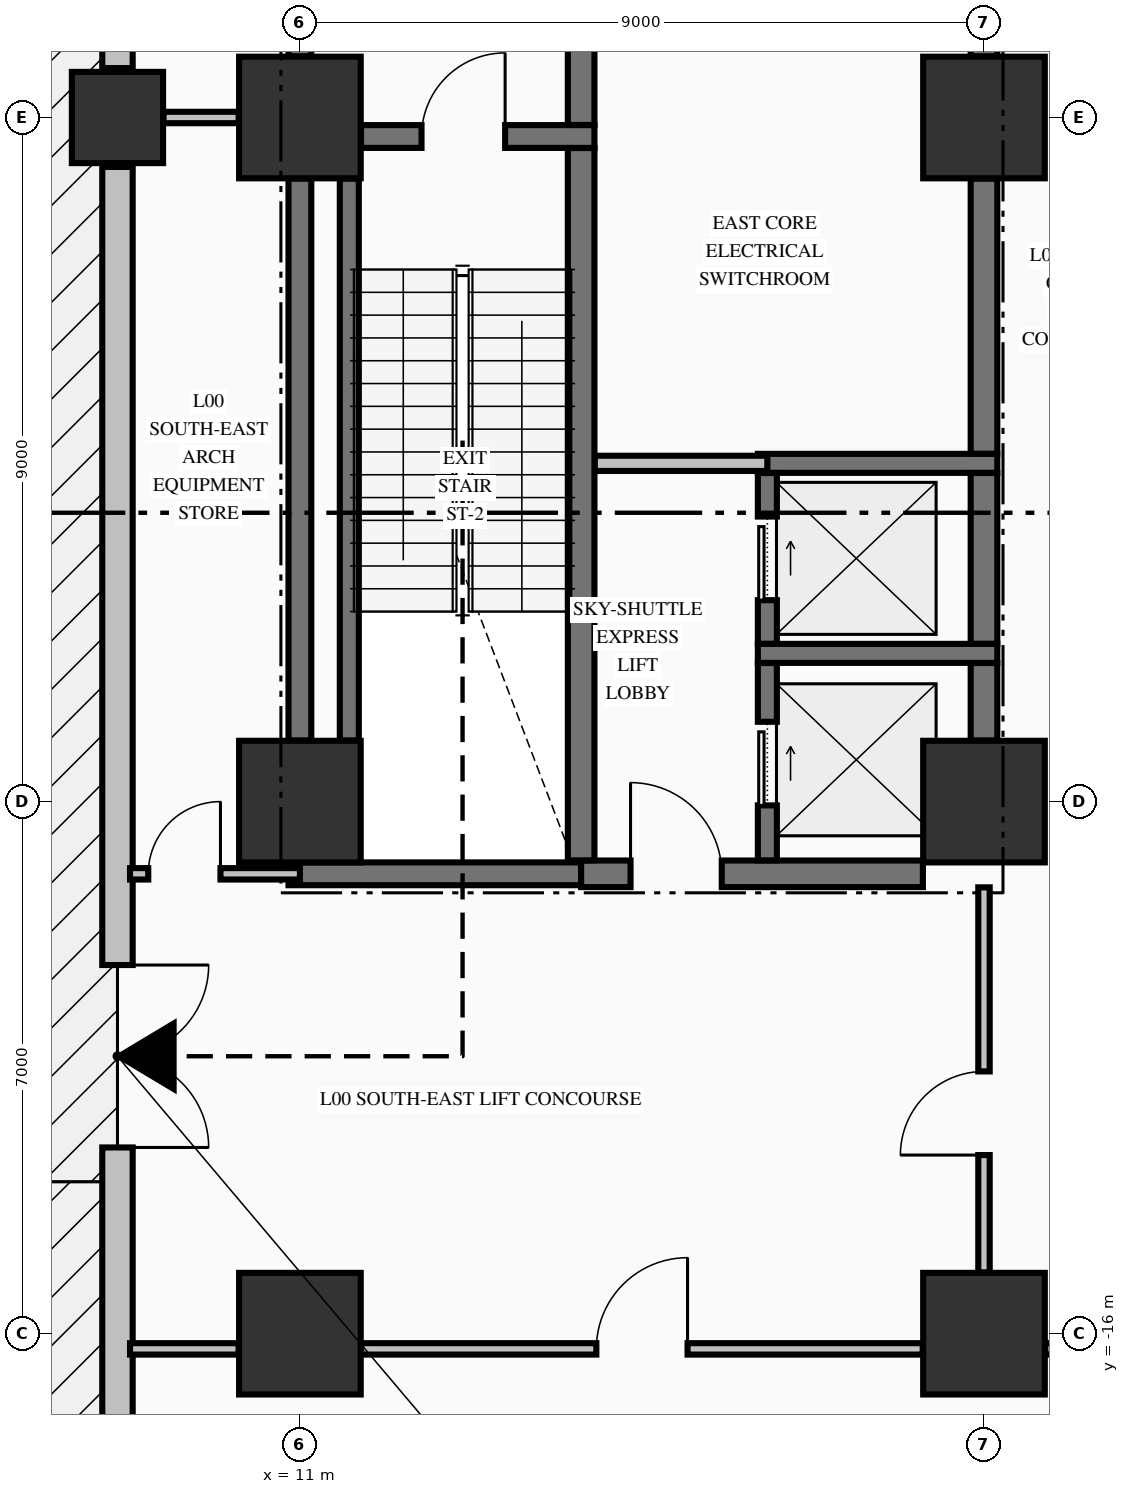
"""IFC4 building model, lengths in metres.
Left out: names, types, materials, properties, quantities, classifications, styles, units other than length and angle.
Written with IfcOpenShell. Run it as: python <this file> out.ifc"""

import sys

from ifc_helpers import new_model, si_unit, direction, frame, frame_2d, origin, origin_2d, place, context, subcontext, project, spatial, rectangle, extrude, element, fill, save


model = new_model("IFC4")
c1 = context("Model", 3, precision=1e-05, world=origin(), true_north=direction((0.0, 1.0)))
c2 = subcontext(c1, "Body", "Model", "MODEL_VIEW")
j1 = project(units=[si_unit("LENGTHUNIT", "METRE"), si_unit("PLANEANGLEUNIT", "RADIAN")], contexts=[c1])
p1 = place(None, origin())
s1 = spatial("IfcSite", under=j1, at=p1, CompositionType="ELEMENT")
p2 = place(p1, origin())
s2 = spatial("IfcBuilding", under=s1, at=p2, CompositionType="ELEMENT")
p3 = place(p2, origin())
s3 = spatial("IfcBuildingStorey", under=s2, at=p3, CompositionType="ELEMENT", Elevation=0.0)
for number, where, z_axis, x_axis in (
    (1, (11.0, -16.0, 0.0), (0.0, 0.0, 1.0), (1.0, 0.0, 0.0)),
    (2, (11.0, -9.0, 0.0), (0.0, 0.0, 1.0), (1.0, 0.0, 0.0)),
    (3, (11.0, 0.0, 0.0), (0.0, 0.0, 1.0), (1.0, 0.0, 0.0)),
    (4, (20.0, -16.0, 0.0), (0.0, 0.0, 1.0), (1.0, 0.0, 0.0)),
    (5, (20.0, -9.0, 0.0), (0.0, 0.0, 1.0), (1.0, 0.0, 0.0)),
    (6, (20.0, 0.0, 0.0), (0.0, 0.0, 1.0), (1.0, 0.0, 0.0)),
):
    element("IfcColumn", number, at=place(p3, frame(where, z_axis=z_axis, x_axis=x_axis)), inside=s3, PredefinedType="COLUMN", context=c2, shape_type="SweptSolid", body=[
        extrude(rectangle(XDim=1.6, YDim=1.6, at=origin_2d()), origin(), (0.0, 0.0, 1.0), 5.09),
    ])
p4 = place(p3, frame((8.6, 0.0, 0.0), z_axis=(0.0, 0.0, 1.0), x_axis=(1.0, 0.0, 0.0)))
e7 = element("IfcColumn", 7, at=p4, inside=s3, PredefinedType="COLUMN", context=c2, shape_type="SweptSolid", body=[
    extrude(rectangle(XDim=1.2, YDim=1.2, at=origin_2d()), origin(), (0.0, 0.0, 1.0), 5.09),
])
p5 = place(p3, frame((8.6, 15.35, 0.0), z_axis=(0.0, 0.0, 1.0), x_axis=(0.0, -1.0, 0.0)))
e8 = element("IfcWall", 8, at=p5, inside=s3, PredefinedType="STANDARD", context=c2, shape_type="SweptSolid", body=[
    extrude(rectangle(XDim=14.7, YDim=0.4, at=frame_2d((7.35, 0.0))), origin(), (0.0, 0.0, 1.0), 4.132),
])
p6 = place(p3, frame((8.6, -0.65, 0.0), z_axis=(0.0, 0.0, 1.0), x_axis=(0.0, -1.0, 0.0)))
e9 = element("IfcWall", 9, at=p6, inside=s3, PredefinedType="STANDARD", context=c2, shape_type="SweptSolid", body=[
    extrude(rectangle(XDim=24.7, YDim=0.4, at=frame_2d((12.35, 0.0))), origin(), (0.0, 0.0, 1.0), 4.132),
])
p7 = place(p6, frame((10.5, 0.0, 0.0)))
e10 = element("IfcOpeningElement", 10, at=p7, cuts=e9, PredefinedType="OPENING", context=c2, shape_type="SweptSolid", body=[
    extrude(rectangle(XDim=2.4, YDim=2.6, at=frame_2d((1.2, 1.3))), frame((0.0, 0.21, 0.0), z_axis=(0.0, -1.0, 0.0), x_axis=(1.0, 0.0, 0.0)), (0.0, 0.0, 1.0), 0.42),
])
p8 = place(p3, frame((10.85, -9.95, 0.0), z_axis=(0.0, 0.0, 1.0), x_axis=(1.0, 0.0, 0.0)))
e11 = element("IfcWall", 11, at=p8, inside=s3, PredefinedType="SHEAR", context=c2, shape_type="SweptSolid", body=[
    extrude(rectangle(XDim=3.85, YDim=0.3, at=frame_2d((1.925, 0.0))), origin(), (0.0, 0.0, 1.0), 5.09),
])
p9 = place(p3, frame((14.7, -9.95, 0.0), z_axis=(0.0, 0.0, 1.0), x_axis=(1.0, 0.0, 0.0)))
e12 = element("IfcWall", 12, at=p9, inside=s3, PredefinedType="SHEAR", context=c2, shape_type="SweptSolid", body=[
    extrude(rectangle(XDim=4.496, YDim=0.35, at=frame_2d((2.248, 0.0))), origin(), (0.0, 0.0, 1.0), 5.09),
])
p10 = place(p9, frame((0.65, 0.0, 0.0)))
e13 = element("IfcOpeningElement", 13, at=p10, cuts=e12, PredefinedType="OPENING", context=c2, shape_type="SweptSolid", body=[
    extrude(rectangle(XDim=1.2, YDim=2.15, at=frame_2d((0.6, 1.075))), frame((0.0, 0.185, 0.0), z_axis=(0.0, -1.0, 0.0), x_axis=(1.0, 0.0, 0.0)), (0.0, 0.0, 1.0), 0.37),
])
for number, where, z_axis, x_axis in (
    (14, (17.025, -7.05, 0.0), (0.0, 0.0, 1.0), (1.0, 0.0, 0.0)),
    (15, (17.025, -4.55, 0.0), (0.0, 0.0, 1.0), (1.0, 0.0, 0.0)),
):
    element("IfcWall", number, at=place(p3, frame(where, z_axis=z_axis, x_axis=x_axis)), inside=s3, PredefinedType="SOLIDWALL", context=c2, shape_type="SweptSolid", body=[
        extrude(rectangle(XDim=3.15, YDim=0.25, at=frame_2d((1.575, 0.0))), origin(), (0.0, 0.0, 1.0), 5.09),
    ])
p11 = place(p3, frame((11.804, -0.25, 0.0), z_axis=(0.0, 0.0, 1.0), x_axis=(1.0, 0.0, 0.0)))
e16 = element("IfcWall", 16, at=p11, inside=s3, PredefinedType="SHEAR", context=c2, shape_type="SweptSolid", body=[
    extrude(rectangle(XDim=3.071, YDim=0.3, at=frame_2d((1.536, 0.0))), origin(), (0.0, 0.0, 1.0), 5.09),
])
p12 = place(p11, frame((0.796, 0.0, 0.0)))
e17 = element("IfcOpeningElement", 17, at=p12, cuts=e16, PredefinedType="OPENING", context=c2, shape_type="SweptSolid", body=[
    extrude(rectangle(XDim=1.1, YDim=2.15, at=frame_2d((0.55, 1.075))), frame((0.0, 0.16, 0.0), z_axis=(0.0, -1.0, 0.0), x_axis=(1.0, 0.0, 0.0)), (0.0, 0.0, 1.0), 0.32),
])
p13 = place(p3, frame((8.765, -16.2, 0.0), z_axis=(0.0, 0.0, 1.0), x_axis=(1.0, 0.0, 0.0)))
e18 = element("IfcWall", 18, at=p13, inside=s3, PredefinedType="PARTITIONING", context=c2, shape_type="SweptSolid", body=[
    extrude(rectangle(XDim=1.429, YDim=0.15, at=frame_2d((0.715, 0.0))), origin(), (0.0, 0.0, 1.0), 5.09),
])
p14 = place(p3, frame((11.806, -16.2, 0.0), z_axis=(0.0, 0.0, 1.0), x_axis=(1.0, 0.0, 0.0)))
e19 = element("IfcWall", 19, at=p14, inside=s3, PredefinedType="PARTITIONING", context=c2, shape_type="SweptSolid", body=[
    extrude(rectangle(XDim=7.388, YDim=0.15, at=frame_2d((3.694, 0.0))), origin(), (0.0, 0.0, 1.0), 4.132),
])
p15 = place(p14, frame((3.094, 0.0, 0.0)))
e20 = element("IfcOpeningElement", 20, at=p15, cuts=e19, PredefinedType="OPENING", context=c2, shape_type="SweptSolid", body=[
    extrude(rectangle(XDim=1.2, YDim=2.15, at=frame_2d((0.6, 1.075))), frame((0.0, 0.085, 0.0), z_axis=(0.0, -1.0, 0.0), x_axis=(1.0, 0.0, 0.0)), (0.0, 0.0, 1.0), 0.17),
])
p16 = place(p3, frame((20.806, -16.2, 0.0), z_axis=(0.0, 0.0, 1.0), x_axis=(1.0, 0.0, 0.0)))
e21 = element("IfcWall", 21, at=p16, inside=s3, PredefinedType="PARTITIONING", context=c2, shape_type="SweptSolid", body=[
    extrude(rectangle(XDim=4.488, YDim=0.15, at=frame_2d((2.244, 0.0))), origin(), (0.0, 0.0, 1.0), 4.132),
])
p17 = place(p16, frame((0.15, 0.0, 0.0)))
e22 = element("IfcOpeningElement", 22, at=p17, cuts=e21, PredefinedType="OPENING", context=c2, shape_type="SweptSolid", body=[
    extrude(rectangle(XDim=1.1, YDim=2.15, at=frame_2d((0.55, 1.075))), frame((0.0, 0.085, 0.0), z_axis=(0.0, -1.0, 0.0), x_axis=(1.0, 0.0, 0.0)), (0.0, 0.0, 1.0), 0.17),
])
p18 = place(p16, frame((2.844, 0.0, 0.0)))
e23 = element("IfcOpeningElement", 23, at=p18, cuts=e21, PredefinedType="OPENING", context=c2, shape_type="SweptSolid", body=[
    extrude(rectangle(XDim=1.1, YDim=2.15, at=frame_2d((0.55, 1.075))), frame((0.0, 0.085, 0.0), z_axis=(0.0, -1.0, 0.0), x_axis=(1.0, 0.0, 0.0)), (0.0, 0.0, 1.0), 0.17),
])
p19 = place(p3, frame((8.765, -9.95, 0.0), z_axis=(0.0, 0.0, 1.0), x_axis=(1.0, 0.0, 0.0)))
e24 = element("IfcWall", 24, at=p19, inside=s3, PredefinedType="PARTITIONING", context=c2, shape_type="SweptSolid", body=[
    extrude(rectangle(XDim=2.235, YDim=0.15, at=frame_2d((1.118, 0.0))), origin(), (0.0, 0.0, 1.0), 5.09),
])
p20 = place(p19, frame((0.24, 0.0, 0.0)))
e25 = element("IfcOpeningElement", 25, at=p20, cuts=e24, PredefinedType="OPENING", context=c2, shape_type="SweptSolid", body=[
    extrude(rectangle(XDim=0.95, YDim=2.15, at=frame_2d((0.475, 1.075))), frame((0.0, 0.085, 0.0), z_axis=(0.0, -1.0, 0.0), x_axis=(1.0, 0.0, 0.0)), (0.0, 0.0, 1.0), 0.17),
])
p21 = place(p3, frame((14.878, -4.55, 0.0), z_axis=(0.0, 0.0, 1.0), x_axis=(1.0, 0.0, 0.0)))
e26 = element("IfcWall", 26, at=p21, inside=s3, PredefinedType="PARTITIONING", context=c2, shape_type="SweptSolid", body=[
    extrude(rectangle(XDim=2.272, YDim=0.2, at=frame_2d((1.136, 0.0))), origin(), (0.0, 0.0, 1.0), 5.09),
])
p22 = place(p3, frame((9.206, 0.0, 0.0), z_axis=(0.0, 0.0, 1.0), x_axis=(1.0, 0.0, 0.0)))
e27 = element("IfcWall", 27, at=p22, inside=s3, PredefinedType="PARTITIONING", context=c2, shape_type="SweptSolid", body=[
    extrude(rectangle(XDim=0.988, YDim=0.15, at=frame_2d((0.494, 0.0))), origin(), (0.0, 0.0, 1.0), 4.132),
])
p23 = place(p3, frame((11.0, -8.196, 0.0), z_axis=(0.0, 0.0, 1.0), x_axis=(0.0, 1.0, 0.0)))
e28 = element("IfcWall", 28, at=p23, inside=s3, PredefinedType="SHEAR", context=c2, shape_type="SweptSolid", body=[
    extrude(rectangle(XDim=7.392, YDim=0.3, at=frame_2d((3.696, 0.0))), origin(), (0.0, 0.0, 1.0), 5.09),
])
p24 = place(p3, frame((11.0, 0.804, 0.0), z_axis=(0.0, 0.0, 1.0), x_axis=(0.0, 1.0, 0.0)))
e29 = element("IfcWall", 29, at=p24, inside=s3, PredefinedType="SHEAR", context=c2, shape_type="SweptSolid", body=[
    extrude(rectangle(XDim=1.944, YDim=0.3, at=frame_2d((0.972, 0.0))), origin(), (0.0, 0.0, 1.0), 5.09),
])
p25 = place(p24, frame((0.296, 0.0, 0.0)))
e30 = element("IfcOpeningElement", 30, at=p25, cuts=e29, PredefinedType="OPENING", context=c2, shape_type="SweptSolid", body=[
    extrude(rectangle(XDim=1.1, YDim=2.15, at=frame_2d((0.55, 1.075))), frame((0.0, 0.16, 0.0), z_axis=(0.0, -1.0, 0.0), x_axis=(1.0, 0.0, 0.0)), (0.0, 0.0, 1.0), 0.32),
])
p26 = place(p3, frame((11.65, -8.196, 0.0), z_axis=(0.0, 0.0, 1.0), x_axis=(0.0, 1.0, 0.0)))
e31 = element("IfcWall", 31, at=p26, inside=s3, PredefinedType="SOLIDWALL", context=c2, shape_type="SweptSolid", body=[
    extrude(rectangle(XDim=7.392, YDim=0.25, at=frame_2d((3.696, 0.0))), origin(), (0.0, 0.0, 1.0), 5.09),
])
p27 = place(p3, frame((14.7, -9.773, 0.0), z_axis=(0.0, 0.0, 1.0), x_axis=(0.0, 1.0, 0.0)))
e32 = element("IfcWall", 32, at=p27, inside=s3, PredefinedType="SHEAR", context=c2, shape_type="SweptSolid", body=[
    extrude(rectangle(XDim=9.371, YDim=0.35, at=frame_2d((4.686, 0.0))), origin(), (0.0, 0.0, 1.0), 5.09),
])
p28 = place(p3, frame((14.7, -0.098, 0.0), z_axis=(0.0, 0.0, 1.0), x_axis=(0.0, 1.0, 0.0)))
e33 = element("IfcWall", 33, at=p28, inside=s3, PredefinedType="SHEAR", context=c2, shape_type="SweptSolid", body=[
    extrude(rectangle(XDim=2.846, YDim=0.35, at=frame_2d((1.423, 0.0))), origin(), (0.0, 0.0, 1.0), 5.09),
])
p29 = place(p3, frame((17.15, -9.773, 0.0), z_axis=(0.0, 0.0, 1.0), x_axis=(0.0, 1.0, 0.0)))
e34 = element("IfcWall", 34, at=p29, inside=s3, PredefinedType="SOLIDWALL", context=c2, shape_type="SweptSolid", body=[
    extrude(rectangle(XDim=2.596, YDim=0.25, at=frame_2d((1.298, 0.0))), origin(), (0.0, 0.0, 1.0), 5.09),
])
p30 = place(p29, frame((0.723, 0.0, 0.0)))
e35 = element("IfcOpeningElement", 35, at=p30, cuts=e34, PredefinedType="OPENING", context=c2, shape_type="SweptSolid", body=[
    extrude(rectangle(XDim=1.1, YDim=2.2, at=frame_2d((0.55, 1.1))), frame((0.0, 0.135, 0.0), z_axis=(0.0, -1.0, 0.0), x_axis=(1.0, 0.0, 0.0)), (0.0, 0.0, 1.0), 0.27),
])
p31 = place(p3, frame((17.15, -6.923, 0.0), z_axis=(0.0, 0.0, 1.0), x_axis=(0.0, 1.0, 0.0)))
e36 = element("IfcWall", 36, at=p31, inside=s3, PredefinedType="SOLIDWALL", context=c2, shape_type="SweptSolid", body=[
    extrude(rectangle(XDim=2.246, YDim=0.25, at=frame_2d((1.123, 0.0))), origin(), (0.0, 0.0, 1.0), 5.09),
])
p32 = place(p31, frame((0.573, 0.0, 0.0)))
e37 = element("IfcOpeningElement", 37, at=p32, cuts=e36, PredefinedType="OPENING", context=c2, shape_type="SweptSolid", body=[
    extrude(rectangle(XDim=1.1, YDim=2.2, at=frame_2d((0.55, 1.1))), frame((0.0, 0.135, 0.0), z_axis=(0.0, -1.0, 0.0), x_axis=(1.0, 0.0, 0.0)), (0.0, 0.0, 1.0), 0.27),
])
p33 = place(p3, frame((20.0, -8.196, 0.0), z_axis=(0.0, 0.0, 1.0), x_axis=(0.0, 1.0, 0.0)))
e38 = element("IfcWall", 38, at=p33, inside=s3, PredefinedType="SHEAR", context=c2, shape_type="SweptSolid", body=[
    extrude(rectangle(XDim=1.019, YDim=0.35, at=frame_2d((0.51, 0.0))), origin(), (0.0, 0.0, 1.0), 5.09),
])
p34 = place(p3, frame((20.0, -6.923, 0.0), z_axis=(0.0, 0.0, 1.0), x_axis=(0.0, 1.0, 0.0)))
e39 = element("IfcWall", 39, at=p34, inside=s3, PredefinedType="SHEAR", context=c2, shape_type="SweptSolid", body=[
    extrude(rectangle(XDim=2.246, YDim=0.35, at=frame_2d((1.123, 0.0))), origin(), (0.0, 0.0, 1.0), 5.09),
])
p35 = place(p3, frame((20.0, -4.423, 0.0), z_axis=(0.0, 0.0, 1.0), x_axis=(0.0, 1.0, 0.0)))
e40 = element("IfcWall", 40, at=p35, inside=s3, PredefinedType="SHEAR", context=c2, shape_type="SweptSolid", body=[
    extrude(rectangle(XDim=3.619, YDim=0.35, at=frame_2d((1.81, 0.0))), origin(), (0.0, 0.0, 1.0), 5.09),
])
p36 = place(p3, frame((20.0, 0.804, 0.0), z_axis=(0.0, 0.0, 1.0), x_axis=(0.0, 1.0, 0.0)))
e41 = element("IfcWall", 41, at=p36, inside=s3, PredefinedType="SHEAR", context=c2, shape_type="SweptSolid", body=[
    extrude(rectangle(XDim=7.392, YDim=0.35, at=frame_2d((3.696, 0.0))), origin(), (0.0, 0.0, 1.0), 5.09),
])
p37 = place(p3, frame((20.0, -15.194, 0.0), z_axis=(0.0, 0.0, 1.0), x_axis=(0.0, 1.0, 0.0)))
e42 = element("IfcWall", 42, at=p37, inside=s3, PredefinedType="PARTITIONING", context=c2, shape_type="SweptSolid", body=[
    extrude(rectangle(XDim=5.066, YDim=0.15, at=frame_2d((2.533, 0.0))), origin(), (0.0, 0.0, 1.0), 4.132),
])
p38 = place(p37, frame((1.544, 0.0, 0.0)))
e43 = element("IfcOpeningElement", 43, at=p38, cuts=e42, PredefinedType="OPENING", context=c2, shape_type="SweptSolid", body=[
    extrude(rectangle(XDim=1.1, YDim=2.15, at=frame_2d((0.55, 1.075))), frame((0.0, 0.085, 0.0), z_axis=(0.0, -1.0, 0.0), x_axis=(1.0, 0.0, 0.0)), (0.0, 0.0, 1.0), 0.17),
])
p39 = place(p7, origin())
e44 = element("IfcDoor", 44, at=p39, inside=s3, OperationType="DOUBLE_DOOR_DOUBLE_SWING", PredefinedType="DOOR", context=c2, shape_type="SweptSolid", body=[
    extrude(rectangle(XDim=2.4, YDim=2.6, at=frame_2d((1.2, 1.3))), frame((0.0, 0.025, 0.0), z_axis=(0.0, -1.0, 0.0), x_axis=(1.0, 0.0, 0.0)), (0.0, 0.0, 1.0), 0.05),
])
fill(e10, e44)
p40 = place(p12, origin())
e45 = element("IfcDoor", 45, at=p40, inside=s3, OperationType="SINGLE_SWING_RIGHT", PredefinedType="DOOR", context=c2, shape_type="SweptSolid", body=[
    extrude(rectangle(XDim=1.1, YDim=2.15, at=frame_2d((0.55, 1.075))), frame((0.0, 0.025, 0.0), z_axis=(0.0, -1.0, 0.0), x_axis=(1.0, 0.0, 0.0)), (0.0, 0.0, 1.0), 0.05),
])
fill(e17, e45)
p41 = place(p30, origin())
e46 = element("IfcDoor", 46, at=p41, inside=s3, OperationType="SLIDING_TO_RIGHT", PredefinedType="DOOR", context=c2, shape_type="SweptSolid", body=[
    extrude(rectangle(XDim=1.1, YDim=2.2, at=frame_2d((0.55, 1.1))), frame((0.0, 0.025, 0.0), z_axis=(0.0, -1.0, 0.0), x_axis=(1.0, 0.0, 0.0)), (0.0, 0.0, 1.0), 0.05),
])
fill(e35, e46)
p42 = place(p32, origin())
e47 = element("IfcDoor", 47, at=p42, inside=s3, OperationType="SLIDING_TO_RIGHT", PredefinedType="DOOR", context=c2, shape_type="SweptSolid", body=[
    extrude(rectangle(XDim=1.1, YDim=2.2, at=frame_2d((0.55, 1.1))), frame((0.0, 0.025, 0.0), z_axis=(0.0, -1.0, 0.0), x_axis=(1.0, 0.0, 0.0)), (0.0, 0.0, 1.0), 0.05),
])
fill(e37, e47)
p43 = place(p10, origin())
e48 = element("IfcDoor", 48, at=p43, inside=s3, OperationType="SINGLE_SWING_LEFT", PredefinedType="DOOR", context=c2, shape_type="SweptSolid", body=[
    extrude(rectangle(XDim=1.2, YDim=2.15, at=frame_2d((0.6, 1.075))), frame((0.0, 0.025, 0.0), z_axis=(0.0, -1.0, 0.0), x_axis=(1.0, 0.0, 0.0)), (0.0, 0.0, 1.0), 0.05),
])
fill(e13, e48)
p44 = place(p20, origin())
e49 = element("IfcDoor", 49, at=p44, inside=s3, OperationType="SINGLE_SWING_RIGHT", PredefinedType="DOOR", context=c2, shape_type="SweptSolid", body=[
    extrude(rectangle(XDim=0.95, YDim=2.15, at=frame_2d((0.475, 1.075))), frame((0.0, 0.025, 0.0), z_axis=(0.0, -1.0, 0.0), x_axis=(1.0, 0.0, 0.0)), (0.0, 0.0, 1.0), 0.05),
])
fill(e25, e49)
p45 = place(p38, origin())
e50 = element("IfcDoor", 50, at=p45, inside=s3, OperationType="SINGLE_SWING_LEFT", PredefinedType="DOOR", context=c2, shape_type="SweptSolid", body=[
    extrude(rectangle(XDim=1.1, YDim=2.15, at=frame_2d((0.55, 1.075))), frame((0.0, 0.025, 0.0), z_axis=(0.0, -1.0, 0.0), x_axis=(1.0, 0.0, 0.0)), (0.0, 0.0, 1.0), 0.05),
])
fill(e43, e50)
p46 = place(p15, origin())
e51 = element("IfcDoor", 51, at=p46, inside=s3, OperationType="SINGLE_SWING_RIGHT", PredefinedType="DOOR", context=c2, shape_type="SweptSolid", body=[
    extrude(rectangle(XDim=1.2, YDim=2.15, at=frame_2d((0.6, 1.075))), frame((0.0, 0.025, 0.0), z_axis=(0.0, -1.0, 0.0), x_axis=(1.0, 0.0, 0.0)), (0.0, 0.0, 1.0), 0.05),
])
fill(e20, e51)
save(model, sys.argv[1])
